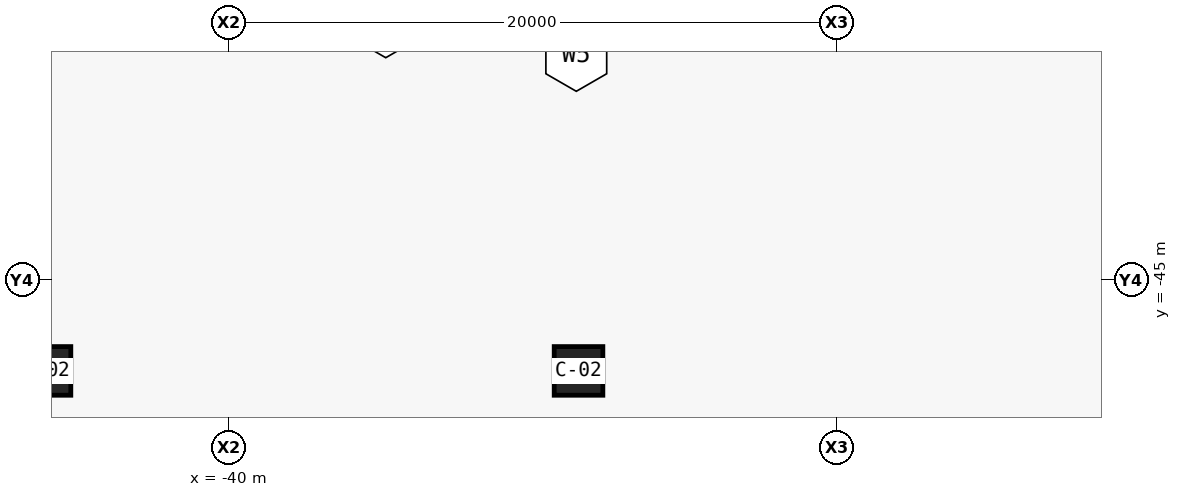
"""IFC4 building model, lengths in metres.
Left out: names, types, materials, properties, quantities, classifications, styles, units other than length and angle.
Written with IfcOpenShell. Run it as: python <this file> out.ifc"""

import sys

from ifc_helpers import new_model, si_unit, direction, frame, origin, origin_2d, place, context, subcontext, project, spatial, rectangle, extrude, element, save


model = new_model("IFC4")
c1 = context("Model", 3, precision=1e-05, world=origin(), true_north=direction((0.0, 1.0)))
c2 = subcontext(c1, "Body", "Model", "MODEL_VIEW")
j1 = project(units=[si_unit("LENGTHUNIT", "METRE"), si_unit("PLANEANGLEUNIT", "RADIAN")], contexts=[c1])
p1 = place(None, origin())
s1 = spatial("IfcSite", under=j1, at=p1, CompositionType="ELEMENT")
p2 = place(p1, origin())
s2 = spatial("IfcBuilding", under=s1, at=p2, CompositionType="ELEMENT")
p3 = place(p2, frame((0.0, 0.0, -4.5)))
s3 = spatial("IfcBuildingStorey", under=s2, at=p3, CompositionType="ELEMENT", Elevation=-4.5)
for number, where, z_axis, x_axis in (
    (1, (-46.0, -48.0, 0.0), (0.0, 0.0, 1.0), (1.0, 0.0, 0.0)),
    (2, (-28.5, -48.0, 0.0), (0.0, 0.0, 1.0), (1.0, 0.0, 0.0)),
):
    element("IfcColumn", number, at=place(p3, frame(where, z_axis=z_axis, x_axis=x_axis)), inside=s3, PredefinedType="COLUMN", context=c2, shape_type="SweptSolid", body=[
        extrude(rectangle(XDim=1.6, YDim=1.6, at=origin_2d()), origin(), (0.0, 0.0, 1.0), 4.5),
    ])
save(model, sys.argv[1])
